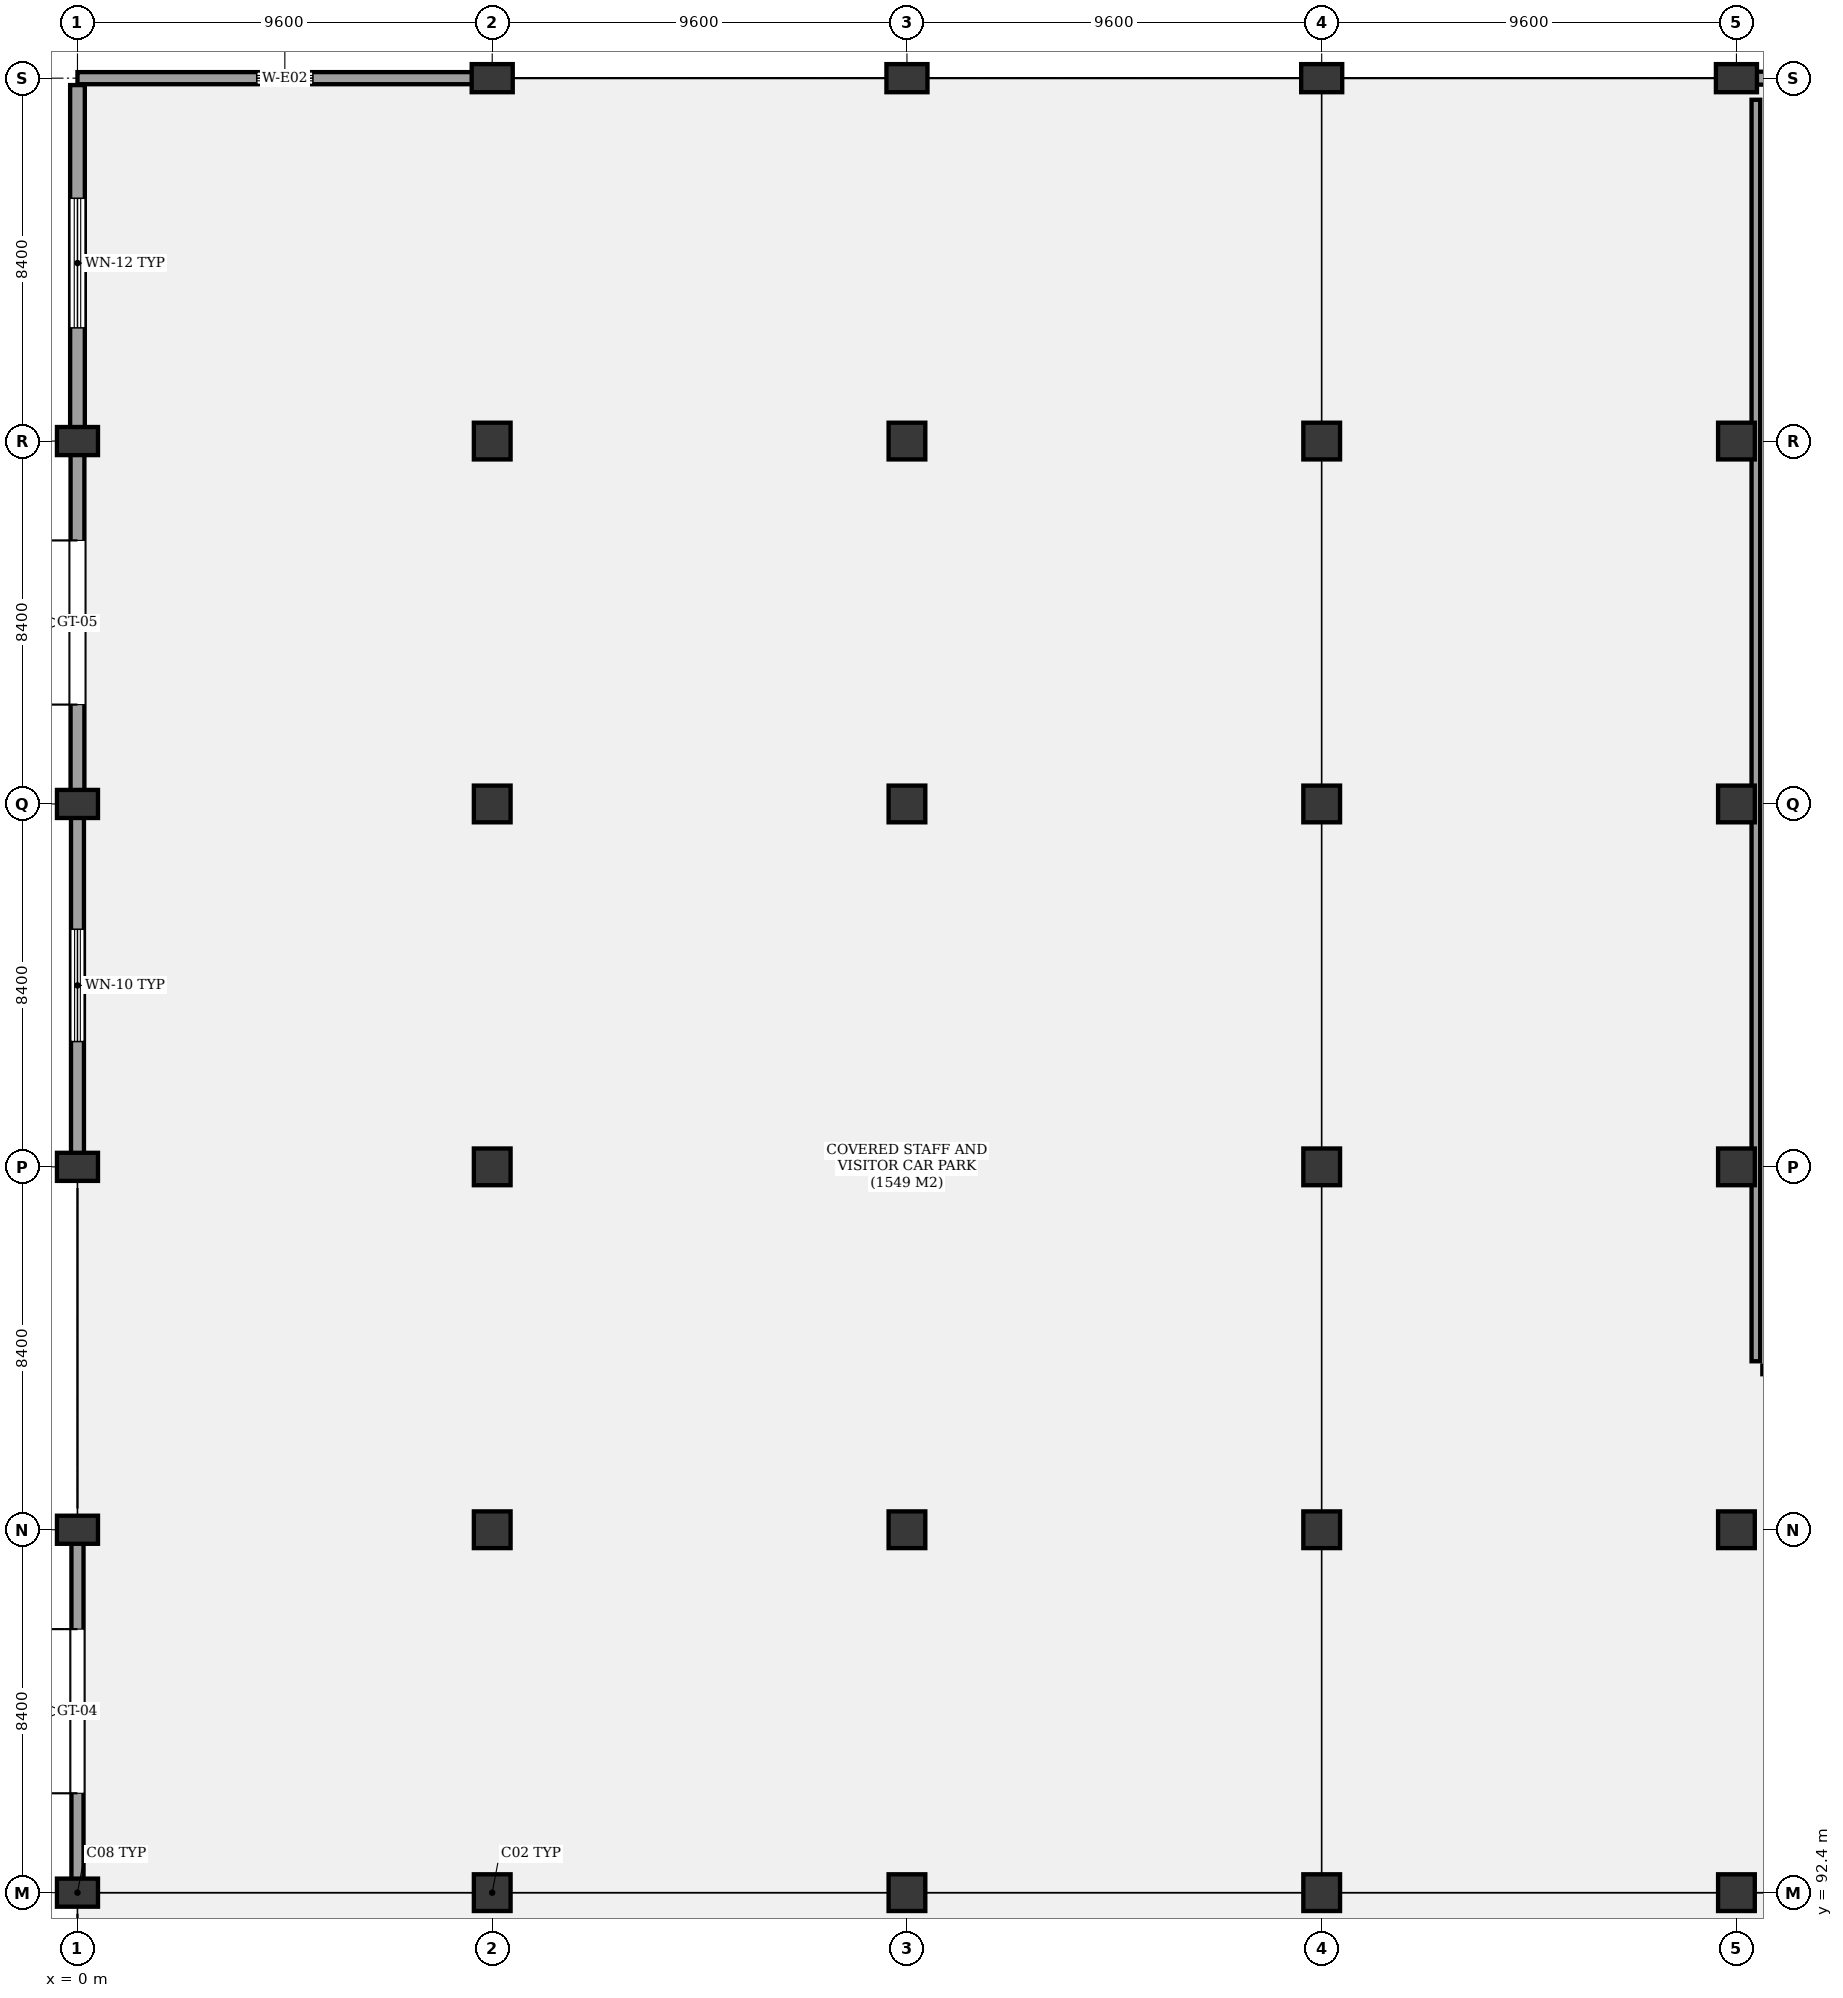
"""IFC4 building model, lengths in metres.
Left out: names, types, materials, properties, quantities, classifications, styles, units other than length and angle.
Written with IfcOpenShell. Run it as: python <this file> out.ifc"""

import sys

from ifc_helpers import new_model, si_unit, direction, frame, frame_2d, origin, origin_2d, place, context, subcontext, project, spatial, rectangle, extrude, element, fill, save


model = new_model("IFC4")
c1 = context("Model", 3, precision=1e-05, world=origin(), true_north=direction((0.0, 1.0)))
c2 = subcontext(c1, "Body", "Model", "MODEL_VIEW")
j1 = project(units=[si_unit("LENGTHUNIT", "METRE"), si_unit("PLANEANGLEUNIT", "RADIAN")], contexts=[c1])
p1 = place(None, origin())
s1 = spatial("IfcSite", under=j1, at=p1, CompositionType="ELEMENT")
p2 = place(p1, origin())
s2 = spatial("IfcBuilding", under=s1, at=p2, CompositionType="ELEMENT")
p3 = place(p2, origin())
s3 = spatial("IfcBuildingStorey", under=s2, at=p3, CompositionType="ELEMENT", Elevation=0.0)
for number, where, z_axis, x_axis in (
    (1, (0.0, 92.4, -0.35), (0.0, 0.0, 1.0), (0.0, 1.0, 0.0)),
    (2, (0.0, 100.8, -0.35), (0.0, 0.0, 1.0), (0.0, 1.0, 0.0)),
    (3, (0.0, 109.2, -0.35), (0.0, 0.0, 1.0), (0.0, 1.0, 0.0)),
    (4, (0.0, 117.6, -0.35), (0.0, 0.0, 1.0), (0.0, 1.0, 0.0)),
    (5, (0.0, 126.0, -0.35), (0.0, 0.0, 1.0), (0.0, 1.0, 0.0)),
):
    element("IfcColumn", number, at=place(p3, frame(where, z_axis=z_axis, x_axis=x_axis)), inside=s3, PredefinedType="COLUMN", context=c2, shape_type="SweptSolid", body=[
        extrude(rectangle(XDim=0.95, YDim=0.65, at=origin_2d()), origin(), (0.0, 0.0, 1.0), 5.45),
    ])
for number, where, z_axis, x_axis in (
    (6, (9.6, 92.4, -0.35), (0.0, 0.0, 1.0), (1.0, 0.0, 0.0)),
    (7, (9.6, 100.8, -0.35), (0.0, 0.0, 1.0), (1.0, 0.0, 0.0)),
    (8, (9.6, 109.2, -0.35), (0.0, 0.0, 1.0), (1.0, 0.0, 0.0)),
    (9, (9.6, 117.6, -0.35), (0.0, 0.0, 1.0), (1.0, 0.0, 0.0)),
    (10, (9.6, 126.0, -0.35), (0.0, 0.0, 1.0), (1.0, 0.0, 0.0)),
):
    element("IfcColumn", number, at=place(p3, frame(where, z_axis=z_axis, x_axis=x_axis)), inside=s3, PredefinedType="COLUMN", context=c2, shape_type="SweptSolid", body=[
        extrude(rectangle(XDim=0.85, YDim=0.85, at=origin_2d()), origin(), (0.0, 0.0, 1.0), 5.45),
    ])
p4 = place(p3, frame((9.6, 134.4, -0.35), z_axis=(0.0, 0.0, 1.0), x_axis=(0.0, 1.0, 0.0)))
e11 = element("IfcColumn", 11, at=p4, inside=s3, PredefinedType="COLUMN", context=c2, shape_type="SweptSolid", body=[
    extrude(rectangle(XDim=0.95, YDim=0.65, at=origin_2d()), origin(), (0.0, 0.0, 1.0), 5.45),
])
for number, where, z_axis, x_axis in (
    (12, (19.2, 92.4, -0.35), (0.0, 0.0, 1.0), (1.0, 0.0, 0.0)),
    (13, (19.2, 100.8, -0.35), (0.0, 0.0, 1.0), (1.0, 0.0, 0.0)),
    (14, (19.2, 109.2, -0.35), (0.0, 0.0, 1.0), (1.0, 0.0, 0.0)),
    (15, (19.2, 117.6, -0.35), (0.0, 0.0, 1.0), (1.0, 0.0, 0.0)),
    (16, (19.2, 126.0, -0.35), (0.0, 0.0, 1.0), (1.0, 0.0, 0.0)),
):
    element("IfcColumn", number, at=place(p3, frame(where, z_axis=z_axis, x_axis=x_axis)), inside=s3, PredefinedType="COLUMN", context=c2, shape_type="SweptSolid", body=[
        extrude(rectangle(XDim=0.85, YDim=0.85, at=origin_2d()), origin(), (0.0, 0.0, 1.0), 5.45),
    ])
p5 = place(p3, frame((19.2, 134.4, -0.35), z_axis=(0.0, 0.0, 1.0), x_axis=(0.0, 1.0, 0.0)))
e17 = element("IfcColumn", 17, at=p5, inside=s3, PredefinedType="COLUMN", context=c2, shape_type="SweptSolid", body=[
    extrude(rectangle(XDim=0.95, YDim=0.65, at=origin_2d()), origin(), (0.0, 0.0, 1.0), 5.45),
])
for number, where, z_axis, x_axis in (
    (18, (28.8, 92.4, -0.35), (0.0, 0.0, 1.0), (1.0, 0.0, 0.0)),
    (19, (28.8, 100.8, -0.35), (0.0, 0.0, 1.0), (1.0, 0.0, 0.0)),
    (20, (28.8, 109.2, -0.35), (0.0, 0.0, 1.0), (1.0, 0.0, 0.0)),
    (21, (28.8, 117.6, -0.35), (0.0, 0.0, 1.0), (1.0, 0.0, 0.0)),
    (22, (28.8, 126.0, -0.35), (0.0, 0.0, 1.0), (1.0, 0.0, 0.0)),
):
    element("IfcColumn", number, at=place(p3, frame(where, z_axis=z_axis, x_axis=x_axis)), inside=s3, PredefinedType="COLUMN", context=c2, shape_type="SweptSolid", body=[
        extrude(rectangle(XDim=0.85, YDim=0.85, at=origin_2d()), origin(), (0.0, 0.0, 1.0), 5.45),
    ])
p6 = place(p3, frame((28.8, 134.4, -0.35), z_axis=(0.0, 0.0, 1.0), x_axis=(0.0, 1.0, 0.0)))
e23 = element("IfcColumn", 23, at=p6, inside=s3, PredefinedType="COLUMN", context=c2, shape_type="SweptSolid", body=[
    extrude(rectangle(XDim=0.95, YDim=0.65, at=origin_2d()), origin(), (0.0, 0.0, 1.0), 5.45),
])
for number, where, z_axis, x_axis in (
    (24, (38.4, 92.4, -0.35), (0.0, 0.0, 1.0), (1.0, 0.0, 0.0)),
    (25, (38.4, 100.8, -0.35), (0.0, 0.0, 1.0), (1.0, 0.0, 0.0)),
    (26, (38.4, 109.2, -0.35), (0.0, 0.0, 1.0), (1.0, 0.0, 0.0)),
    (27, (38.4, 117.6, -0.35), (0.0, 0.0, 1.0), (1.0, 0.0, 0.0)),
    (28, (38.4, 126.0, -0.35), (0.0, 0.0, 1.0), (1.0, 0.0, 0.0)),
):
    element("IfcColumn", number, at=place(p3, frame(where, z_axis=z_axis, x_axis=x_axis)), inside=s3, PredefinedType="COLUMN", context=c2, shape_type="SweptSolid", body=[
        extrude(rectangle(XDim=0.85, YDim=0.85, at=origin_2d()), origin(), (0.0, 0.0, 1.0), 5.45),
    ])
p7 = place(p3, frame((38.4, 134.4, -0.35), z_axis=(0.0, 0.0, 1.0), x_axis=(0.0, 1.0, 0.0)))
e29 = element("IfcColumn", 29, at=p7, inside=s3, PredefinedType="COLUMN", context=c2, shape_type="SweptSolid", body=[
    extrude(rectangle(XDim=0.95, YDim=0.65, at=origin_2d()), origin(), (0.0, 0.0, 1.0), 5.45),
])
p8 = place(p3, frame((0.0, 134.4, 0.0), z_axis=(0.0, 0.0, 1.0), x_axis=(1.0, 0.0, 0.0)))
e30 = element("IfcWall", 30, at=p8, inside=s3, PredefinedType="SOLIDWALL", context=c2, shape_type="SweptSolid", body=[
    extrude(rectangle(XDim=9.6, YDim=0.28, at=frame_2d((4.8, 0.0))), origin(), (0.0, 0.0, 1.0), 4.24),
])
p9 = place(p8, frame((4.15, 0.0, 0.85)))
e31 = element("IfcOpeningElement", 31, at=p9, cuts=e30, PredefinedType="OPENING", context=c2, shape_type="SweptSolid", body=[
    extrude(rectangle(XDim=1.3, YDim=1.6, at=frame_2d((0.65, 0.8))), frame((0.0, 0.15, 0.0), z_axis=(0.0, -1.0, 0.0), x_axis=(1.0, 0.0, 0.0)), (0.0, 0.0, 1.0), 0.3),
])
p10 = place(p3, frame((38.4, 134.4, 0.0), z_axis=(0.0, 0.0, 1.0), x_axis=(1.0, 0.0, 0.0)))
e32 = element("IfcWall", 32, at=p10, inside=s3, PredefinedType="SOLIDWALL", context=c2, shape_type="SweptSolid", body=[
    extrude(rectangle(XDim=9.6, YDim=0.3, at=frame_2d((4.8, 0.0))), origin(), (0.0, 0.0, 1.0), 4.24),
])
p11 = place(p10, frame((3.7, 0.0, 0.0)))
e33 = element("IfcOpeningElement", 33, at=p11, cuts=e32, PredefinedType="OPENING", context=c2, shape_type="SweptSolid", body=[
    extrude(rectangle(XDim=2.2, YDim=2.5, at=frame_2d((1.1, 1.25))), frame((0.0, 0.16, 0.0), z_axis=(0.0, -1.0, 0.0), x_axis=(1.0, 0.0, 0.0)), (0.0, 0.0, 1.0), 0.32),
])
p12 = place(p3, frame((0.0, 92.4, 0.0), z_axis=(0.0, 0.0, 1.0), x_axis=(0.0, 1.0, 0.0)))
e34 = element("IfcWall", 34, at=p12, inside=s3, PredefinedType="SOLIDWALL", context=c2, shape_type="SweptSolid", body=[
    extrude(rectangle(XDim=8.4, YDim=0.28, at=frame_2d((4.2, 0.0))), origin(), (0.0, 0.0, 1.0), 4.24),
])
p13 = place(p12, frame((2.3, 0.0, 0.0)))
e35 = element("IfcOpeningElement", 35, at=p13, cuts=e34, PredefinedType="OPENING", context=c2, shape_type="SweptSolid", body=[
    extrude(rectangle(XDim=3.8, YDim=2.7, at=frame_2d((1.9, 1.35))), frame((0.0, 0.15, 0.0), z_axis=(0.0, -1.0, 0.0), x_axis=(1.0, 0.0, 0.0)), (0.0, 0.0, 1.0), 0.3),
])
p14 = place(p3, frame((0.0, 109.2, 0.0), z_axis=(0.0, 0.0, 1.0), x_axis=(0.0, 1.0, 0.0)))
e36 = element("IfcWall", 36, at=p14, inside=s3, PredefinedType="SOLIDWALL", context=c2, shape_type="SweptSolid", body=[
    extrude(rectangle(XDim=8.4, YDim=0.3, at=frame_2d((4.2, 0.0))), origin(), (0.0, 0.0, 1.0), 4.24),
])
p15 = place(p14, frame((2.9, 0.0, 0.85)))
e37 = element("IfcOpeningElement", 37, at=p15, cuts=e36, PredefinedType="OPENING", context=c2, shape_type="SweptSolid", body=[
    extrude(rectangle(XDim=2.6, YDim=1.2, at=frame_2d((1.3, 0.6))), frame((0.0, 0.16, 0.0), z_axis=(0.0, -1.0, 0.0), x_axis=(1.0, 0.0, 0.0)), (0.0, 0.0, 1.0), 0.32),
])
p16 = place(p3, frame((0.0, 117.6, 0.0), z_axis=(0.0, 0.0, 1.0), x_axis=(0.0, 1.0, 0.0)))
e38 = element("IfcWall", 38, at=p16, inside=s3, PredefinedType="SOLIDWALL", context=c2, shape_type="SweptSolid", body=[
    extrude(rectangle(XDim=8.4, YDim=0.32, at=frame_2d((4.2, 0.0))), origin(), (0.0, 0.0, 1.0), 4.24),
])
p17 = place(p16, frame((2.3, 0.0, 0.0)))
e39 = element("IfcOpeningElement", 39, at=p17, cuts=e38, PredefinedType="OPENING", context=c2, shape_type="SweptSolid", body=[
    extrude(rectangle(XDim=3.8, YDim=2.7, at=frame_2d((1.9, 1.35))), frame((0.0, 0.17, 0.0), z_axis=(0.0, -1.0, 0.0), x_axis=(1.0, 0.0, 0.0)), (0.0, 0.0, 1.0), 0.34),
])
p18 = place(p3, frame((0.0, 126.0, 0.0), z_axis=(0.0, 0.0, 1.0), x_axis=(0.0, 1.0, 0.0)))
e40 = element("IfcWall", 40, at=p18, inside=s3, PredefinedType="SOLIDWALL", context=c2, shape_type="SweptSolid", body=[
    extrude(rectangle(XDim=8.24, YDim=0.34, at=frame_2d((4.12, 0.0))), origin(), (0.0, 0.0, 1.0), 4.24),
])
p19 = place(p18, frame((2.62, 0.0, 0.85)))
e41 = element("IfcOpeningElement", 41, at=p19, cuts=e40, PredefinedType="OPENING", context=c2, shape_type="SweptSolid", body=[
    extrude(rectangle(XDim=3.0, YDim=1.2, at=frame_2d((1.5, 0.6))), frame((0.0, 0.18, 0.0), z_axis=(0.0, -1.0, 0.0), x_axis=(1.0, 0.0, 0.0)), (0.0, 0.0, 1.0), 0.36),
])
p20 = place(p3, frame((38.85, 104.7, 0.0), z_axis=(0.0, 0.0, 1.0), x_axis=(0.0, 1.0, 0.0)))
e42 = element("IfcWall", 42, at=p20, inside=s3, PredefinedType="PARTITIONING", context=c2, shape_type="SweptSolid", body=[
    extrude(rectangle(XDim=29.2, YDim=0.2, at=frame_2d((14.6, 0.0))), origin(), (0.0, 0.0, 1.0), 3.98),
])
p21 = place(p9, origin())
e43 = element("IfcWindow", 43, at=p21, inside=s3, PartitioningType="SINGLE_PANEL", PredefinedType="WINDOW", context=c2, shape_type="SweptSolid", body=[
    extrude(rectangle(XDim=1.3, YDim=1.6, at=frame_2d((0.65, 0.8))), frame((0.0, 0.03, 0.0), z_axis=(0.0, -1.0, 0.0), x_axis=(1.0, 0.0, 0.0)), (0.0, 0.0, 1.0), 0.06),
])
fill(e31, e43)
p22 = place(p13, origin())
e44 = element("IfcDoor", 44, at=p22, inside=s3, OperationType="DOUBLE_DOOR_SINGLE_SWING", PredefinedType="GATE", context=c2, shape_type="SweptSolid", body=[
    extrude(rectangle(XDim=3.8, YDim=2.7, at=frame_2d((1.9, 1.35))), frame((0.0, 0.025, 0.0), z_axis=(0.0, -1.0, 0.0), x_axis=(1.0, 0.0, 0.0)), (0.0, 0.0, 1.0), 0.05),
])
fill(e35, e44)
p23 = place(p15, origin())
e45 = element("IfcWindow", 45, at=p23, inside=s3, PartitioningType="SINGLE_PANEL", PredefinedType="WINDOW", context=c2, shape_type="SweptSolid", body=[
    extrude(rectangle(XDim=2.6, YDim=1.2, at=frame_2d((1.3, 0.6))), frame((0.0, 0.03, 0.0), z_axis=(0.0, -1.0, 0.0), x_axis=(1.0, 0.0, 0.0)), (0.0, 0.0, 1.0), 0.06),
])
fill(e37, e45)
p24 = place(p17, origin())
e46 = element("IfcDoor", 46, at=p24, inside=s3, OperationType="DOUBLE_DOOR_SINGLE_SWING", PredefinedType="GATE", context=c2, shape_type="SweptSolid", body=[
    extrude(rectangle(XDim=3.8, YDim=2.7, at=frame_2d((1.9, 1.35))), frame((0.0, 0.025, 0.0), z_axis=(0.0, -1.0, 0.0), x_axis=(1.0, 0.0, 0.0)), (0.0, 0.0, 1.0), 0.05),
])
fill(e39, e46)
p25 = place(p19, origin())
e47 = element("IfcWindow", 47, at=p25, inside=s3, PartitioningType="SINGLE_PANEL", PredefinedType="WINDOW", context=c2, shape_type="SweptSolid", body=[
    extrude(rectangle(XDim=3.0, YDim=1.2, at=frame_2d((1.5, 0.6))), frame((0.0, 0.03, 0.0), z_axis=(0.0, -1.0, 0.0), x_axis=(1.0, 0.0, 0.0)), (0.0, 0.0, 1.0), 0.06),
])
fill(e41, e47)
save(model, sys.argv[1])
